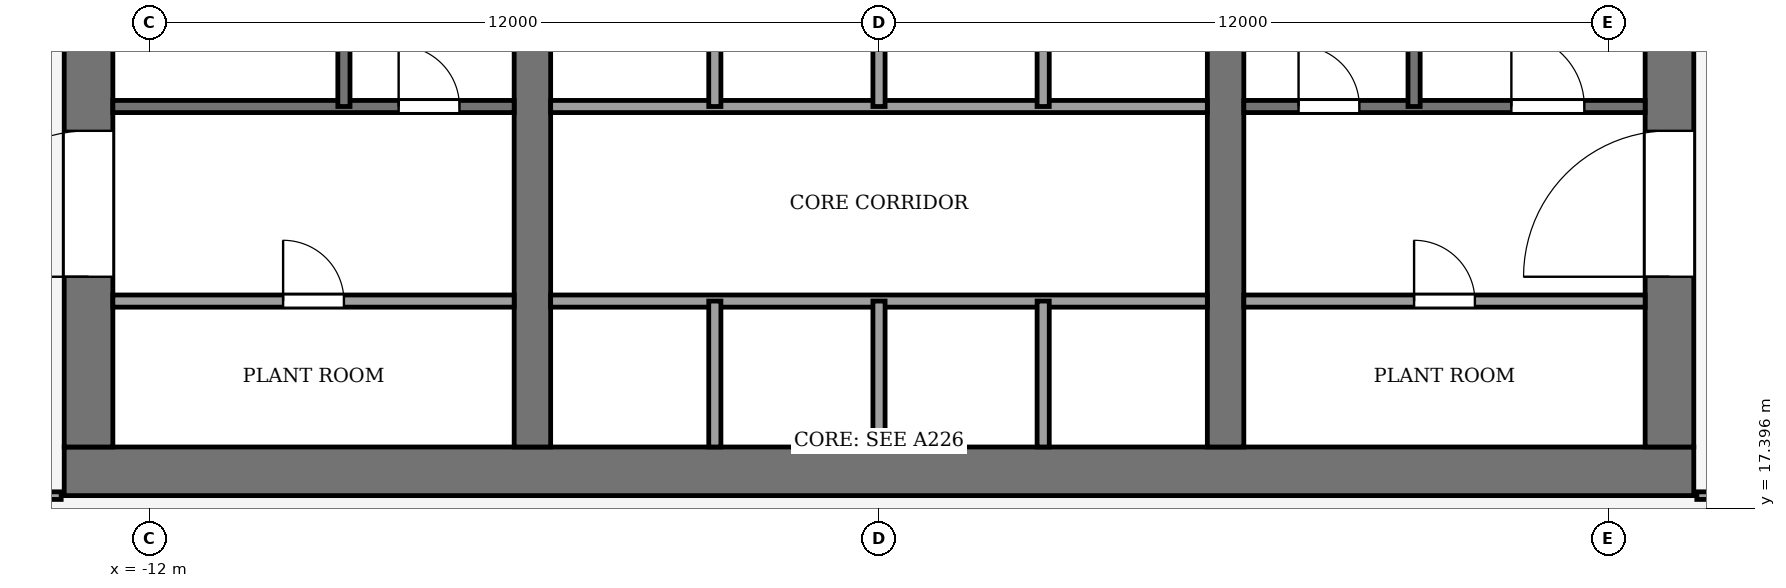
"""IFC4 building model, lengths in metres.
Left out: names, types, materials, properties, quantities, classifications, styles, units other than length and angle.
Written with IfcOpenShell. Run it as: python <this file> out.ifc"""

import sys

from ifc_helpers import new_model, si_unit, direction, frame, frame_2d, origin, place, context, subcontext, project, spatial, rectangle, extrude, element, fill, save


model = new_model("IFC4")
c1 = context("Model", 3, precision=1e-05, world=origin(), true_north=direction((0.0, 1.0)))
c2 = subcontext(c1, "Body", "Model", "MODEL_VIEW")
j1 = project(units=[si_unit("LENGTHUNIT", "METRE"), si_unit("PLANEANGLEUNIT", "RADIAN")], contexts=[c1])
p1 = place(None, origin())
s1 = spatial("IfcSite", under=j1, at=p1, CompositionType="ELEMENT")
p2 = place(p1, origin())
s2 = spatial("IfcBuilding", under=s1, at=p2, CompositionType="ELEMENT")
p3 = place(p2, frame((0.0, 0.0, 282.0)))
s3 = spatial("IfcBuildingStorey", under=s2, at=p3, CompositionType="ELEMENT", Elevation=282.0)
p4 = place(p3, frame((-13.4, 18.0, -0.25), z_axis=(0.0, 0.0, 1.0), x_axis=(1.0, 0.0, 0.0)))
e1 = element("IfcWall", 1, at=p4, inside=s3, PredefinedType="SHEAR", context=c2, shape_type="SweptSolid", body=[
    extrude(rectangle(XDim=26.8, YDim=0.8, at=frame_2d((13.4, 0.0))), origin(), (0.0, 0.0, 1.0), 7.12),
])
p5 = place(p3, frame((-13.0, 18.4, -0.25), z_axis=(0.0, 0.0, 1.0), x_axis=(0.0, 1.0, 0.0)))
e2 = element("IfcWall", 2, at=p5, inside=s3, PredefinedType="SHEAR", context=c2, shape_type="SweptSolid", body=[
    extrude(rectangle(XDim=19.2, YDim=0.8, at=frame_2d((9.6, 0.0))), origin(), (0.0, 0.0, 1.0), 7.12),
])
p6 = place(p5, frame((2.8, 0.0, 0.25)))
e3 = element("IfcOpeningElement", 3, at=p6, cuts=e2, PredefinedType="OPENING", context=c2, shape_type="SweptSolid", body=[
    extrude(rectangle(XDim=2.4, YDim=2.4, at=frame_2d((1.2, 1.2))), frame((0.0, 0.41, 0.0), z_axis=(0.0, -1.0, 0.0), x_axis=(1.0, 0.0, 0.0)), (0.0, 0.0, 1.0), 0.82),
])
p7 = place(p5, frame((13.4, 0.0, 0.25)))
e4 = element("IfcOpeningElement", 4, at=p7, cuts=e2, PredefinedType="OPENING", context=c2, shape_type="SweptSolid", body=[
    extrude(rectangle(XDim=1.4, YDim=2.2, at=frame_2d((0.7, 1.1))), frame((0.0, 0.41, 0.0), z_axis=(0.0, -1.0, 0.0), x_axis=(1.0, 0.0, 0.0)), (0.0, 0.0, 1.0), 0.82),
])
p8 = place(p3, frame((13.0, 18.4, -0.25), z_axis=(0.0, 0.0, 1.0), x_axis=(0.0, 1.0, 0.0)))
e5 = element("IfcWall", 5, at=p8, inside=s3, PredefinedType="SHEAR", context=c2, shape_type="SweptSolid", body=[
    extrude(rectangle(XDim=19.2, YDim=0.8, at=frame_2d((9.6, 0.0))), origin(), (0.0, 0.0, 1.0), 7.12),
])
p9 = place(p8, frame((2.8, 0.0, 0.25)))
e6 = element("IfcOpeningElement", 6, at=p9, cuts=e5, PredefinedType="OPENING", context=c2, shape_type="SweptSolid", body=[
    extrude(rectangle(XDim=2.4, YDim=2.4, at=frame_2d((1.2, 1.2))), frame((0.0, 0.41, 0.0), z_axis=(0.0, -1.0, 0.0), x_axis=(1.0, 0.0, 0.0)), (0.0, 0.0, 1.0), 0.82),
])
p10 = place(p8, frame((13.3, 0.0, 0.25)))
e7 = element("IfcOpeningElement", 7, at=p10, cuts=e5, PredefinedType="OPENING", context=c2, shape_type="SweptSolid", body=[
    extrude(rectangle(XDim=2.4, YDim=2.4, at=frame_2d((1.2, 1.2))), frame((0.0, 0.41, 0.0), z_axis=(0.0, -1.0, 0.0), x_axis=(1.0, 0.0, 0.0)), (0.0, 0.0, 1.0), 0.82),
])
p11 = place(p3, frame((-5.7, 18.4, -0.25), z_axis=(0.0, 0.0, 1.0), x_axis=(0.0, 1.0, 0.0)))
e8 = element("IfcWall", 8, at=p11, inside=s3, PredefinedType="SHEAR", context=c2, shape_type="SweptSolid", body=[
    extrude(rectangle(XDim=19.2, YDim=0.6, at=frame_2d((9.6, 0.0))), origin(), (0.0, 0.0, 1.0), 7.12),
])
p12 = place(p11, frame((8.35, 0.0, 0.25)))
e9 = element("IfcOpeningElement", 9, at=p12, cuts=e8, PredefinedType="OPENING", context=c2, shape_type="SweptSolid", body=[
    extrude(rectangle(XDim=0.9, YDim=2.1, at=frame_2d((0.45, 1.05))), frame((0.0, 0.31, 0.0), z_axis=(0.0, -1.0, 0.0), x_axis=(1.0, 0.0, 0.0)), (0.0, 0.0, 1.0), 0.62),
])
p13 = place(p3, frame((5.7, 18.4, -0.25), z_axis=(0.0, 0.0, 1.0), x_axis=(0.0, 1.0, 0.0)))
e10 = element("IfcWall", 10, at=p13, inside=s3, PredefinedType="SHEAR", context=c2, shape_type="SweptSolid", body=[
    extrude(rectangle(XDim=19.2, YDim=0.6, at=frame_2d((9.6, 0.0))), origin(), (0.0, 0.0, 1.0), 7.12),
])
p14 = place(p13, frame((13.3, 0.0, 0.25)))
e11 = element("IfcOpeningElement", 11, at=p14, cuts=e10, PredefinedType="OPENING", context=c2, shape_type="SweptSolid", body=[
    extrude(rectangle(XDim=2.4, YDim=2.4, at=frame_2d((1.2, 1.2))), frame((0.0, 0.31, 0.0), z_axis=(0.0, -1.0, 0.0), x_axis=(1.0, 0.0, 0.0)), (0.0, 0.0, 1.0), 0.62),
])
p15 = place(p3, frame((-12.6, 20.8, 0.0), z_axis=(0.0, 0.0, 1.0), x_axis=(1.0, 0.0, 0.0)))
e12 = element("IfcWall", 12, at=p15, inside=s3, PredefinedType="PARTITIONING", context=c2, shape_type="SweptSolid", body=[
    extrude(rectangle(XDim=6.6, YDim=0.2, at=frame_2d((3.3, 0.0))), origin(), (0.0, 0.0, 1.0), 6.87),
])
p16 = place(p15, frame((2.8, 0.0, 0.0)))
e13 = element("IfcOpeningElement", 13, at=p16, cuts=e12, PredefinedType="OPENING", context=c2, shape_type="SweptSolid", body=[
    extrude(rectangle(XDim=1.0, YDim=2.1, at=frame_2d((0.5, 1.05))), frame((0.0, 0.11, 0.0), z_axis=(0.0, -1.0, 0.0), x_axis=(1.0, 0.0, 0.0)), (0.0, 0.0, 1.0), 0.22),
])
p17 = place(p3, frame((-5.4, 20.8, 0.0), z_axis=(0.0, 0.0, 1.0), x_axis=(1.0, 0.0, 0.0)))
e14 = element("IfcWall", 14, at=p17, inside=s3, PredefinedType="PARTITIONING", context=c2, shape_type="SweptSolid", body=[
    extrude(rectangle(XDim=10.8, YDim=0.2, at=frame_2d((5.4, 0.0))), origin(), (0.0, 0.0, 1.0), 6.87),
])
p18 = place(p3, frame((6.0, 20.8, 0.0), z_axis=(0.0, 0.0, 1.0), x_axis=(1.0, 0.0, 0.0)))
e15 = element("IfcWall", 15, at=p18, inside=s3, PredefinedType="PARTITIONING", context=c2, shape_type="SweptSolid", body=[
    extrude(rectangle(XDim=6.6, YDim=0.2, at=frame_2d((3.3, 0.0))), origin(), (0.0, 0.0, 1.0), 6.87),
])
p19 = place(p18, frame((2.8, 0.0, 0.0)))
e16 = element("IfcOpeningElement", 16, at=p19, cuts=e15, PredefinedType="OPENING", context=c2, shape_type="SweptSolid", body=[
    extrude(rectangle(XDim=1.0, YDim=2.1, at=frame_2d((0.5, 1.05))), frame((0.0, 0.11, 0.0), z_axis=(0.0, -1.0, 0.0), x_axis=(1.0, 0.0, 0.0)), (0.0, 0.0, 1.0), 0.22),
])
p20 = place(p3, frame((-12.6, 24.0, 0.0), z_axis=(0.0, 0.0, 1.0), x_axis=(1.0, 0.0, 0.0)))
e17 = element("IfcWall", 17, at=p20, inside=s3, PredefinedType="PARTITIONING", context=c2, shape_type="SweptSolid", body=[
    extrude(rectangle(XDim=6.6, YDim=0.2, at=frame_2d((3.3, 0.0))), origin(), (0.0, 0.0, 1.0), 6.87),
])
p21 = place(p20, frame((4.7, 0.0, 0.0)))
e18 = element("IfcOpeningElement", 18, at=p21, cuts=e17, PredefinedType="OPENING", context=c2, shape_type="SweptSolid", body=[
    extrude(rectangle(XDim=1.0, YDim=2.1, at=frame_2d((0.5, 1.05))), frame((0.0, 0.11, 0.0), z_axis=(0.0, -1.0, 0.0), x_axis=(1.0, 0.0, 0.0)), (0.0, 0.0, 1.0), 0.22),
])
p22 = place(p3, frame((-5.4, 24.0, 0.0), z_axis=(0.0, 0.0, 1.0), x_axis=(1.0, 0.0, 0.0)))
e19 = element("IfcWall", 19, at=p22, inside=s3, PredefinedType="PARTITIONING", context=c2, shape_type="SweptSolid", body=[
    extrude(rectangle(XDim=10.8, YDim=0.2, at=frame_2d((5.4, 0.0))), origin(), (0.0, 0.0, 1.0), 6.87),
])
p23 = place(p3, frame((6.0, 24.0, 0.0), z_axis=(0.0, 0.0, 1.0), x_axis=(1.0, 0.0, 0.0)))
e20 = element("IfcWall", 20, at=p23, inside=s3, PredefinedType="PARTITIONING", context=c2, shape_type="SweptSolid", body=[
    extrude(rectangle(XDim=6.6, YDim=0.2, at=frame_2d((3.3, 0.0))), origin(), (0.0, 0.0, 1.0), 6.87),
])
p24 = place(p23, frame((0.9, 0.0, 0.0)))
e21 = element("IfcOpeningElement", 21, at=p24, cuts=e20, PredefinedType="OPENING", context=c2, shape_type="SweptSolid", body=[
    extrude(rectangle(XDim=1.0, YDim=2.1, at=frame_2d((0.5, 1.05))), frame((0.0, 0.11, 0.0), z_axis=(0.0, -1.0, 0.0), x_axis=(1.0, 0.0, 0.0)), (0.0, 0.0, 1.0), 0.22),
])
p25 = place(p23, frame((4.4, 0.0, 0.0)))
e22 = element("IfcOpeningElement", 22, at=p25, cuts=e20, PredefinedType="OPENING", context=c2, shape_type="SweptSolid", body=[
    extrude(rectangle(XDim=1.2, YDim=2.2, at=frame_2d((0.6, 1.1))), frame((0.0, 0.11, 0.0), z_axis=(0.0, -1.0, 0.0), x_axis=(1.0, 0.0, 0.0)), (0.0, 0.0, 1.0), 0.22),
])
p26 = place(p3, frame((-8.8, 24.0, 0.0), z_axis=(0.0, 0.0, 1.0), x_axis=(0.0, 1.0, 0.0)))
e23 = element("IfcWall", 23, at=p26, inside=s3, PredefinedType="PARTITIONING", context=c2, shape_type="SweptSolid", body=[
    extrude(rectangle(XDim=7.4, YDim=0.2, at=frame_2d((3.7, 0.0))), origin(), (0.0, 0.0, 1.0), 6.87),
])
p27 = place(p3, frame((-2.7, 18.4, 0.0), z_axis=(0.0, 0.0, 1.0), x_axis=(0.0, 1.0, 0.0)))
e24 = element("IfcWall", 24, at=p27, inside=s3, PredefinedType="PARTITIONING", context=c2, shape_type="SweptSolid", body=[
    extrude(rectangle(XDim=2.4, YDim=0.2, at=frame_2d((1.2, 0.0))), origin(), (0.0, 0.0, 1.0), 6.87),
])
p28 = place(p3, frame((-2.7, 24.0, 0.0), z_axis=(0.0, 0.0, 1.0), x_axis=(0.0, 1.0, 0.0)))
e25 = element("IfcWall", 25, at=p28, inside=s3, PredefinedType="PARTITIONING", context=c2, shape_type="SweptSolid", body=[
    extrude(rectangle(XDim=2.4, YDim=0.2, at=frame_2d((1.2, 0.0))), origin(), (0.0, 0.0, 1.0), 6.87),
])
p29 = place(p3, frame((0.0, 18.4, 0.0), z_axis=(0.0, 0.0, 1.0), x_axis=(0.0, 1.0, 0.0)))
e26 = element("IfcWall", 26, at=p29, inside=s3, PredefinedType="PARTITIONING", context=c2, shape_type="SweptSolid", body=[
    extrude(rectangle(XDim=2.4, YDim=0.2, at=frame_2d((1.2, 0.0))), origin(), (0.0, 0.0, 1.0), 6.87),
])
p30 = place(p3, frame((0.0, 24.0, 0.0), z_axis=(0.0, 0.0, 1.0), x_axis=(0.0, 1.0, 0.0)))
e27 = element("IfcWall", 27, at=p30, inside=s3, PredefinedType="PARTITIONING", context=c2, shape_type="SweptSolid", body=[
    extrude(rectangle(XDim=2.4, YDim=0.2, at=frame_2d((1.2, 0.0))), origin(), (0.0, 0.0, 1.0), 6.87),
])
p31 = place(p3, frame((2.7, 18.4, 0.0), z_axis=(0.0, 0.0, 1.0), x_axis=(0.0, 1.0, 0.0)))
e28 = element("IfcWall", 28, at=p31, inside=s3, PredefinedType="PARTITIONING", context=c2, shape_type="SweptSolid", body=[
    extrude(rectangle(XDim=2.4, YDim=0.2, at=frame_2d((1.2, 0.0))), origin(), (0.0, 0.0, 1.0), 6.87),
])
p32 = place(p3, frame((2.7, 24.0, 0.0), z_axis=(0.0, 0.0, 1.0), x_axis=(0.0, 1.0, 0.0)))
e29 = element("IfcWall", 29, at=p32, inside=s3, PredefinedType="PARTITIONING", context=c2, shape_type="SweptSolid", body=[
    extrude(rectangle(XDim=2.4, YDim=0.2, at=frame_2d((1.2, 0.0))), origin(), (0.0, 0.0, 1.0), 6.87),
])
p33 = place(p3, frame((8.8, 24.0, 0.0), z_axis=(0.0, 0.0, 1.0), x_axis=(0.0, 1.0, 0.0)))
e30 = element("IfcWall", 30, at=p33, inside=s3, PredefinedType="PARTITIONING", context=c2, shape_type="SweptSolid", body=[
    extrude(rectangle(XDim=7.4, YDim=0.2, at=frame_2d((3.7, 0.0))), origin(), (0.0, 0.0, 1.0), 6.87),
])
for number, where, z_axis, x_axis in (
    (31, (15.598, 17.6, 0.0), (0.0, 0.0, 1.0), (-1.0, 0.0, 0.0)),
    (32, (-13.45, 17.6, 0.0), (0.0, 0.0, 1.0), (-1.0, 0.0, 0.0)),
):
    element("IfcWall", number, at=place(p3, frame(where, z_axis=z_axis, x_axis=x_axis)), inside=s3, PredefinedType="PARTITIONING", context=c2, shape_type="SweptSolid", body=[
        extrude(rectangle(XDim=2.148, YDim=0.125, at=frame_2d((1.074, 0.0))), origin(), (0.0, 0.0, 1.0), 6.14),
    ])
p34 = place(p16, origin())
e33 = element("IfcDoor", 33, at=p34, inside=s3, OperationType="SINGLE_SWING_RIGHT", PredefinedType="DOOR", context=c2, shape_type="SweptSolid", body=[
    extrude(rectangle(XDim=1.0, YDim=2.1, at=frame_2d((0.5, 1.05))), frame((0.0, 0.025, 0.0), z_axis=(0.0, -1.0, 0.0), x_axis=(1.0, 0.0, 0.0)), (0.0, 0.0, 1.0), 0.05),
])
fill(e13, e33)
p35 = place(p19, origin())
e34 = element("IfcDoor", 34, at=p35, inside=s3, OperationType="SINGLE_SWING_LEFT", PredefinedType="DOOR", context=c2, shape_type="SweptSolid", body=[
    extrude(rectangle(XDim=1.0, YDim=2.1, at=frame_2d((0.5, 1.05))), frame((0.0, 0.025, 0.0), z_axis=(0.0, -1.0, 0.0), x_axis=(1.0, 0.0, 0.0)), (0.0, 0.0, 1.0), 0.05),
])
fill(e16, e34)
p36 = place(p21, origin())
e35 = element("IfcDoor", 35, at=p36, inside=s3, OperationType="SINGLE_SWING_LEFT", PredefinedType="DOOR", context=c2, shape_type="SweptSolid", body=[
    extrude(rectangle(XDim=1.0, YDim=2.1, at=frame_2d((0.5, 1.05))), frame((0.0, 0.025, 0.0), z_axis=(0.0, -1.0, 0.0), x_axis=(1.0, 0.0, 0.0)), (0.0, 0.0, 1.0), 0.05),
])
fill(e18, e35)
p37 = place(p24, origin())
e36 = element("IfcDoor", 36, at=p37, inside=s3, OperationType="SINGLE_SWING_RIGHT", PredefinedType="DOOR", context=c2, shape_type="SweptSolid", body=[
    extrude(rectangle(XDim=1.0, YDim=2.1, at=frame_2d((0.5, 1.05))), frame((0.0, 0.025, 0.0), z_axis=(0.0, -1.0, 0.0), x_axis=(1.0, 0.0, 0.0)), (0.0, 0.0, 1.0), 0.05),
])
fill(e21, e36)
p38 = place(p25, origin())
e37 = element("IfcDoor", 37, at=p38, inside=s3, OperationType="SINGLE_SWING_RIGHT", PredefinedType="DOOR", context=c2, shape_type="SweptSolid", body=[
    extrude(rectangle(XDim=1.2, YDim=2.2, at=frame_2d((0.6, 1.1))), frame((0.0, 0.025, 0.0), z_axis=(0.0, -1.0, 0.0), x_axis=(1.0, 0.0, 0.0)), (0.0, 0.0, 1.0), 0.05),
])
fill(e22, e37)
p39 = place(p6, origin())
e38 = element("IfcDoor", 38, at=p39, inside=s3, OperationType="DOUBLE_DOOR_SINGLE_SWING", PredefinedType="DOOR", context=c2, shape_type="SweptSolid", body=[
    extrude(rectangle(XDim=2.4, YDim=2.4, at=frame_2d((1.2, 1.2))), frame((0.0, 0.025, 0.0), z_axis=(0.0, -1.0, 0.0), x_axis=(1.0, 0.0, 0.0)), (0.0, 0.0, 1.0), 0.05),
])
fill(e3, e38)
p40 = place(p9, origin())
e39 = element("IfcDoor", 39, at=p40, inside=s3, OperationType="DOUBLE_DOOR_SINGLE_SWING", PredefinedType="DOOR", context=c2, shape_type="SweptSolid", body=[
    extrude(rectangle(XDim=2.4, YDim=2.4, at=frame_2d((1.2, 1.2))), frame((0.0, 0.025, 0.0), z_axis=(0.0, -1.0, 0.0), x_axis=(1.0, 0.0, 0.0)), (0.0, 0.0, 1.0), 0.05),
])
fill(e6, e39)
save(model, sys.argv[1])
